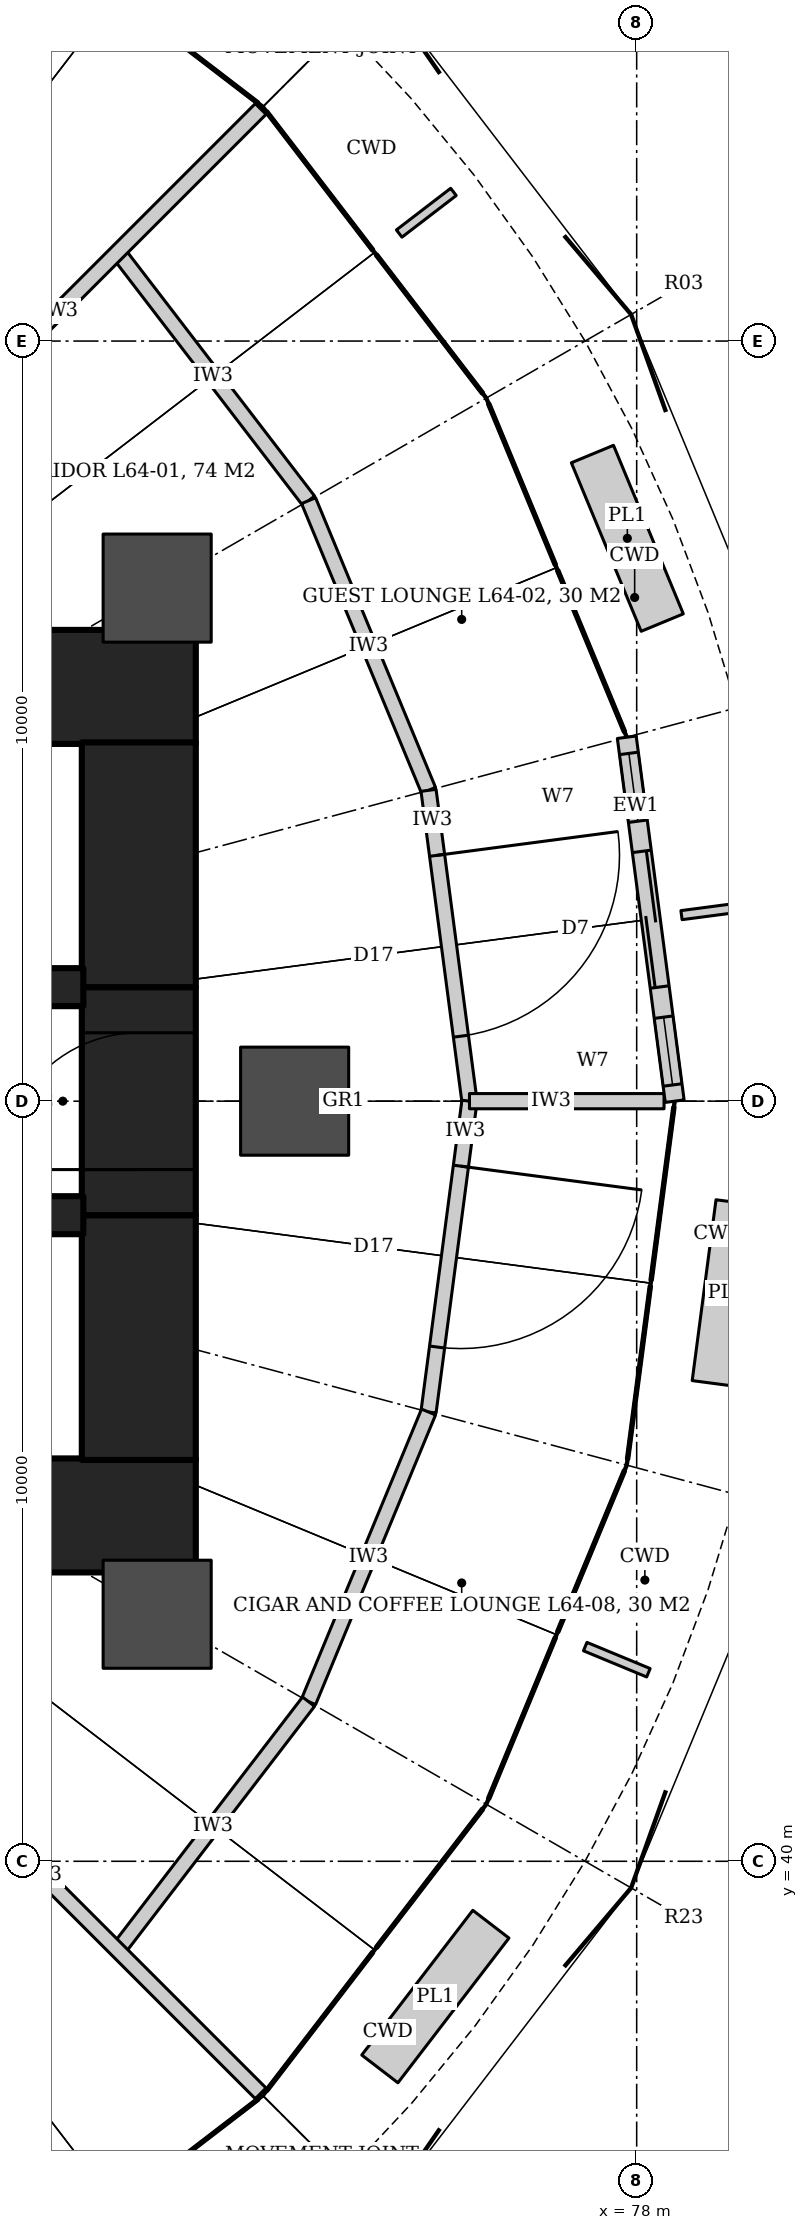
"""IFC4 building model, lengths in metres.
Left out: names, types, materials, properties, quantities, classifications, styles, units other than length and angle.
Written with IfcOpenShell. Run it as: python <this file> out.ifc"""

import sys

from ifc_helpers import new_model, si_unit, direction, frame, frame_2d, origin, origin_2d, place, context, subcontext, project, spatial, rectangle, hollow_circle, extrude, element, fill, save


model = new_model("IFC4")
c1 = context("Model", 3, precision=1e-05, world=origin(), true_north=direction((0.0, 1.0)))
c2 = subcontext(c1, "Body", "Model", "MODEL_VIEW")
j1 = project(units=[si_unit("LENGTHUNIT", "METRE"), si_unit("PLANEANGLEUNIT", "RADIAN")], contexts=[c1])
p1 = place(None, origin())
s1 = spatial("IfcSite", under=j1, at=p1, CompositionType="ELEMENT")
p2 = place(p1, origin())
s2 = spatial("IfcBuilding", under=s1, at=p2, CompositionType="ELEMENT")
p3 = place(p2, frame((0.0, 0.0, 278.0)))
s3 = spatial("IfcBuildingStorey", under=s2, at=p3, CompositionType="ELEMENT", Elevation=278.0)
for number, where, z_axis, x_axis in (
    (1, (64.6, 55.45, 0.0), (0.0, 0.0, 1.0), (1.0, 0.0, 0.0)),
    (2, (64.6, 44.55, 0.0), (0.0, 0.0, 1.0), (1.0, 0.0, 0.0)),
):
    element("IfcWall", number, at=place(p3, frame(where, z_axis=z_axis, x_axis=x_axis)), inside=s3, PredefinedType="SHEAR", context=c2, shape_type="SweptSolid", body=[
        extrude(rectangle(XDim=7.6, YDim=1.5, at=frame_2d((3.8, 0.0))), origin(), (0.0, 0.0, 1.0), 4.2),
    ])
p4 = place(p3, frame((71.45, 45.28, 0.0), z_axis=(0.0, 0.0, 1.0), x_axis=(0.0, 1.0, 0.0)))
e3 = element("IfcWall", 3, at=p4, inside=s3, PredefinedType="SHEAR", context=c2, shape_type="SweptSolid", body=[
    extrude(rectangle(XDim=3.22, YDim=1.5, at=frame_2d((1.61, 0.0))), origin(), (0.0, 0.0, 1.0), 4.2),
])
p5 = place(p3, frame((71.45, 48.5, 0.0), z_axis=(0.0, 0.0, 1.0), x_axis=(0.0, 1.0, 0.0)))
e4 = element("IfcWall", 4, at=p5, inside=s3, PredefinedType="SHEAR", context=c2, shape_type="SweptSolid", body=[
    extrude(rectangle(XDim=3.0, YDim=1.5, at=frame_2d((1.5, 0.0))), origin(), (0.0, 0.0, 1.0), 4.2),
])
p6 = place(p5, frame((0.6, 0.0, 0.0)))
e5 = element("IfcOpeningElement", 5, at=p6, cuts=e4, PredefinedType="OPENING", context=c2, shape_type="SweptSolid", body=[
    extrude(rectangle(XDim=1.8, YDim=2.1, at=frame_2d((0.9, 1.05))), frame((0.0, 0.76, 0.0), z_axis=(0.0, -1.0, 0.0), x_axis=(1.0, 0.0, 0.0)), (0.0, 0.0, 1.0), 1.52),
])
p7 = place(p3, frame((71.45, 51.5, 0.0), z_axis=(0.0, 0.0, 1.0), x_axis=(0.0, 1.0, 0.0)))
e6 = element("IfcWall", 6, at=p7, inside=s3, PredefinedType="SHEAR", context=c2, shape_type="SweptSolid", body=[
    extrude(rectangle(XDim=3.22, YDim=1.5, at=frame_2d((1.61, 0.0))), origin(), (0.0, 0.0, 1.0), 4.2),
])
p8 = place(p3, frame((64.6, 51.5, 0.0), z_axis=(0.0, 0.0, 1.0), x_axis=(1.0, 0.0, 0.0)))
e7 = element("IfcWall", 7, at=p8, inside=s3, PredefinedType="SHEAR", context=c2, shape_type="SweptSolid", body=[
    extrude(rectangle(XDim=6.12, YDim=0.5, at=frame_2d((3.06, 0.0))), origin(), (0.0, 0.0, 1.0), 4.2),
])
p9 = place(p8, frame((1.0, 0.0, 0.0)))
e8 = element("IfcOpeningElement", 8, at=p9, cuts=e7, PredefinedType="OPENING", context=c2, shape_type="SweptSolid", body=[
    extrude(rectangle(XDim=1.2, YDim=2.1, at=frame_2d((0.6, 1.05))), frame((0.0, 0.26, 0.0), z_axis=(0.0, -1.0, 0.0), x_axis=(1.0, 0.0, 0.0)), (0.0, 0.0, 1.0), 0.52),
])
p10 = place(p8, frame((4.2, 0.0, 0.0)))
e9 = element("IfcOpeningElement", 9, at=p10, cuts=e7, PredefinedType="OPENING", context=c2, shape_type="SweptSolid", body=[
    extrude(rectangle(XDim=1.2, YDim=2.1, at=frame_2d((0.6, 1.05))), frame((0.0, 0.26, 0.0), z_axis=(0.0, -1.0, 0.0), x_axis=(1.0, 0.0, 0.0)), (0.0, 0.0, 1.0), 0.52),
])
p11 = place(p3, frame((64.6, 48.5, 0.0), z_axis=(0.0, 0.0, 1.0), x_axis=(1.0, 0.0, 0.0)))
e10 = element("IfcWall", 10, at=p11, inside=s3, PredefinedType="SHEAR", context=c2, shape_type="SweptSolid", body=[
    extrude(rectangle(XDim=6.12, YDim=0.5, at=frame_2d((3.06, 0.0))), origin(), (0.0, 0.0, 1.0), 4.2),
])
p12 = place(p11, frame((0.5, 0.0, 0.0)))
e11 = element("IfcOpeningElement", 11, at=p12, cuts=e10, PredefinedType="OPENING", context=c2, shape_type="SweptSolid", body=[
    extrude(rectangle(XDim=1.0, YDim=2.1, at=frame_2d((0.5, 1.05))), frame((0.0, 0.26, 0.0), z_axis=(0.0, -1.0, 0.0), x_axis=(1.0, 0.0, 0.0)), (0.0, 0.0, 1.0), 0.52),
])
for number, where, z_axis, x_axis in (
    (12, (73.5, 50.0, 0.0), (0.0, 0.0, 1.0), (1.0, 0.0, 0.0)),
    (13, (71.691, 56.75, 0.0), (0.0, 0.0, 1.0), (1.0, 0.0, 0.0)),
    (14, (71.691, 43.25, 0.0), (0.0, 0.0, 1.0), (1.0, 0.0, 0.0)),
):
    element("IfcColumn", number, at=place(p3, frame(where, z_axis=z_axis, x_axis=x_axis)), inside=s3, PredefinedType="COLUMN", context=c2, shape_type="SweptSolid", body=[
        extrude(hollow_circle(Radius=0.711, WallThickness=0.07, at=origin_2d()), origin(), (0.0, 0.0, 1.0), 4.2),
    ])
p13 = place(p3, frame((71.172, 61.172, 0.0), z_axis=(0.0, 0.0, 1.0), x_axis=(0.608714823874, -0.793389099494, 0.0)))
e15 = element("IfcWall", 15, at=p13, inside=s3, PredefinedType="PARTITIONING", context=c2, shape_type="SweptSolid", body=[
    extrude(rectangle(XDim=4.125, YDim=0.2, at=frame_2d((2.062, 0.0))), origin(), (0.0, 0.0, 1.0), 3.02),
])
p14 = place(p3, frame((73.683, 57.9, 0.0), z_axis=(0.0, 0.0, 1.0), x_axis=(0.382731667114, -0.923859551549, 0.0)))
e16 = element("IfcWall", 16, at=p14, inside=s3, PredefinedType="PARTITIONING", context=c2, shape_type="SweptSolid", body=[
    extrude(rectangle(XDim=4.125, YDim=0.2, at=frame_2d((2.062, 0.0))), origin(), (0.0, 0.0, 1.0), 3.02),
])
p15 = place(p3, frame((75.262, 54.089, 0.0), z_axis=(0.0, 0.0, 1.0), x_axis=(0.130515758099, -0.991446234996, 0.0)))
e17 = element("IfcWall", 17, at=p15, inside=s3, PredefinedType="PARTITIONING", context=c2, shape_type="SweptSolid", body=[
    extrude(rectangle(XDim=4.125, YDim=0.2, at=frame_2d((2.062, 0.0))), origin(), (0.0, 0.0, 1.0), 3.02),
])
p16 = place(p15, frame((0.862, 0.0, 0.0)))
e18 = element("IfcOpeningElement", 18, at=p16, cuts=e17, PredefinedType="OPENING", context=c2, shape_type="SweptSolid", body=[
    extrude(rectangle(XDim=2.4, YDim=2.4, at=frame_2d((1.2, 1.2))), frame((0.0, 0.11, 0.0), z_axis=(0.0, -1.0, 0.0), x_axis=(1.0, 0.0, 0.0)), (0.0, 0.0, 1.0), 0.22),
])
p17 = place(p3, frame((75.8, 50.0, 0.0), z_axis=(0.0, 0.0, 1.0), x_axis=(-0.130515758099, -0.991446234996, 0.0)))
e19 = element("IfcWall", 19, at=p17, inside=s3, PredefinedType="PARTITIONING", context=c2, shape_type="SweptSolid", body=[
    extrude(rectangle(XDim=4.125, YDim=0.2, at=frame_2d((2.062, 0.0))), origin(), (0.0, 0.0, 1.0), 3.02),
])
p18 = place(p17, frame((0.862, 0.0, 0.0)))
e20 = element("IfcOpeningElement", 20, at=p18, cuts=e19, PredefinedType="OPENING", context=c2, shape_type="SweptSolid", body=[
    extrude(rectangle(XDim=2.4, YDim=2.4, at=frame_2d((1.2, 1.2))), frame((0.0, 0.11, 0.0), z_axis=(0.0, -1.0, 0.0), x_axis=(1.0, 0.0, 0.0)), (0.0, 0.0, 1.0), 0.22),
])
p19 = place(p3, frame((75.262, 45.911, 0.0), z_axis=(0.0, 0.0, 1.0), x_axis=(-0.382731667114, -0.923859551549, 0.0)))
e21 = element("IfcWall", 21, at=p19, inside=s3, PredefinedType="PARTITIONING", context=c2, shape_type="SweptSolid", body=[
    extrude(rectangle(XDim=4.125, YDim=0.2, at=frame_2d((2.062, 0.0))), origin(), (0.0, 0.0, 1.0), 3.02),
])
p20 = place(p3, frame((73.683, 42.1, 0.0), z_axis=(0.0, 0.0, 1.0), x_axis=(-0.608714823874, -0.793389099494, 0.0)))
e22 = element("IfcWall", 22, at=p20, inside=s3, PredefinedType="PARTITIONING", context=c2, shape_type="SweptSolid", body=[
    extrude(rectangle(XDim=4.125, YDim=0.2, at=frame_2d((2.062, 0.0))), origin(), (0.0, 0.0, 1.0), 3.02),
])
p21 = place(p3, frame((75.8, 50.0, 0.0), z_axis=(0.0, 0.0, 1.0), x_axis=(1.0, 0.0, 0.0)))
e23 = element("IfcWall", 23, at=p21, inside=s3, PredefinedType="PARTITIONING", context=c2, shape_type="SweptSolid", body=[
    extrude(rectangle(XDim=2.56, YDim=0.2, at=frame_2d((1.28, 0.0))), origin(), (0.0, 0.0, 1.0), 3.02),
])
p22 = place(p3, frame((66.2, 56.2, 0.0), z_axis=(0.0, 0.0, 1.0), x_axis=(0.707106781187, 0.707106781187, 0.0)))
e24 = element("IfcWall", 24, at=p22, inside=s3, PredefinedType="PARTITIONING", context=c2, shape_type="SweptSolid", body=[
    extrude(rectangle(XDim=9.692, YDim=0.2, at=frame_2d((4.846, 0.0))), origin(), (0.0, 0.0, 1.0), 3.02),
])
p23 = place(p22, frame((2.516, 0.0, 0.0)))
e25 = element("IfcOpeningElement", 25, at=p23, cuts=e24, PredefinedType="OPENING", context=c2, shape_type="SweptSolid", body=[
    extrude(rectangle(XDim=2.0, YDim=2.7, at=frame_2d((1.0, 1.35))), frame((0.0, 0.11, 0.0), z_axis=(0.0, -1.0, 0.0), x_axis=(1.0, 0.0, 0.0)), (0.0, 0.0, 1.0), 0.22),
])
p24 = place(p3, frame((66.2, 43.8, 0.0), z_axis=(0.0, 0.0, 1.0), x_axis=(0.707106781187, -0.707106781187, 0.0)))
e26 = element("IfcWall", 26, at=p24, inside=s3, PredefinedType="PARTITIONING", context=c2, shape_type="SweptSolid", body=[
    extrude(rectangle(XDim=9.692, YDim=0.2, at=frame_2d((4.846, 0.0))), origin(), (0.0, 0.0, 1.0), 3.02),
])
p25 = place(p3, frame((78.5, 50.0, 0.0), z_axis=(0.0, 0.0, 1.0), x_axis=(-0.130527743461, 0.991444657148, 0.0)))
e27 = element("IfcWall", 27, at=p25, inside=s3, PredefinedType="SOLIDWALL", context=c2, shape_type="SweptSolid", body=[
    extrude(rectangle(XDim=4.829, YDim=0.25, at=frame_2d((2.415, 0.0))), origin(), (0.0, 0.0, 1.0), 4.04),
])
p26 = place(p25, frame((1.515, 0.0, 0.0)))
e28 = element("IfcOpeningElement", 28, at=p26, cuts=e27, PredefinedType="OPENING", context=c2, shape_type="SweptSolid", body=[
    extrude(rectangle(XDim=1.8, YDim=2.4, at=frame_2d((0.9, 1.2))), frame((0.0, 0.135, 0.0), z_axis=(0.0, -1.0, 0.0), x_axis=(1.0, 0.0, 0.0)), (0.0, 0.0, 1.0), 0.27),
])
p27 = place(p25, frame((0.215, 0.0, 0.0)))
e29 = element("IfcOpeningElement", 29, at=p27, cuts=e27, PredefinedType="OPENING", context=c2, shape_type="SweptSolid", body=[
    extrude(rectangle(XDim=0.9, YDim=2.4, at=frame_2d((0.45, 1.2))), frame((0.0, 0.135, 0.0), z_axis=(0.0, -1.0, 0.0), x_axis=(1.0, 0.0, 0.0)), (0.0, 0.0, 1.0), 0.27),
])
p28 = place(p25, frame((3.715, 0.0, 0.0)))
e30 = element("IfcOpeningElement", 30, at=p28, cuts=e27, PredefinedType="OPENING", context=c2, shape_type="SweptSolid", body=[
    extrude(rectangle(XDim=0.9, YDim=2.4, at=frame_2d((0.45, 1.2))), frame((0.0, 0.135, 0.0), z_axis=(0.0, -1.0, 0.0), x_axis=(1.0, 0.0, 0.0)), (0.0, 0.0, 1.0), 0.27),
])
p29 = place(p16, origin())
e31 = element("IfcDoor", 31, at=p29, inside=s3, OperationType="DOUBLE_DOOR_DOUBLE_SWING", PredefinedType="DOOR", context=c2, shape_type="SweptSolid", body=[
    extrude(rectangle(XDim=2.4, YDim=2.4, at=frame_2d((1.2, 1.2))), frame((0.0, 0.025, 0.0), z_axis=(0.0, -1.0, 0.0), x_axis=(1.0, 0.0, 0.0)), (0.0, 0.0, 1.0), 0.05),
])
fill(e18, e31)
p30 = place(p18, origin())
e32 = element("IfcDoor", 32, at=p30, inside=s3, OperationType="DOUBLE_DOOR_DOUBLE_SWING", PredefinedType="DOOR", context=c2, shape_type="SweptSolid", body=[
    extrude(rectangle(XDim=2.4, YDim=2.4, at=frame_2d((1.2, 1.2))), frame((0.0, 0.025, 0.0), z_axis=(0.0, -1.0, 0.0), x_axis=(1.0, 0.0, 0.0)), (0.0, 0.0, 1.0), 0.05),
])
fill(e20, e32)
p31 = place(p26, origin())
e33 = element("IfcDoor", 33, at=p31, inside=s3, OperationType="DOUBLE_DOOR_SLIDING", PredefinedType="DOOR", context=c2, shape_type="SweptSolid", body=[
    extrude(rectangle(XDim=1.8, YDim=2.4, at=frame_2d((0.9, 1.2))), frame((0.0, 0.025, 0.0), z_axis=(0.0, -1.0, 0.0), x_axis=(1.0, 0.0, 0.0)), (0.0, 0.0, 1.0), 0.05),
])
fill(e28, e33)
p32 = place(p27, origin())
e34 = element("IfcWindow", 34, at=p32, inside=s3, PartitioningType="SINGLE_PANEL", PredefinedType="WINDOW", context=c2, shape_type="SweptSolid", body=[
    extrude(rectangle(XDim=0.9, YDim=2.4, at=frame_2d((0.45, 1.2))), frame((0.0, 0.03, 0.0), z_axis=(0.0, -1.0, 0.0), x_axis=(1.0, 0.0, 0.0)), (0.0, 0.0, 1.0), 0.06),
])
fill(e29, e34)
p33 = place(p28, origin())
e35 = element("IfcWindow", 35, at=p33, inside=s3, PartitioningType="SINGLE_PANEL", PredefinedType="WINDOW", context=c2, shape_type="SweptSolid", body=[
    extrude(rectangle(XDim=0.9, YDim=2.4, at=frame_2d((0.45, 1.2))), frame((0.0, 0.03, 0.0), z_axis=(0.0, -1.0, 0.0), x_axis=(1.0, 0.0, 0.0)), (0.0, 0.0, 1.0), 0.06),
])
fill(e30, e35)
p34 = place(p6, origin())
e36 = element("IfcDoor", 36, at=p34, inside=s3, OperationType="DOUBLE_DOOR_DOUBLE_SWING", PredefinedType="DOOR", context=c2, shape_type="SweptSolid", body=[
    extrude(rectangle(XDim=1.8, YDim=2.1, at=frame_2d((0.9, 1.05))), frame((0.0, 0.025, 0.0), z_axis=(0.0, -1.0, 0.0), x_axis=(1.0, 0.0, 0.0)), (0.0, 0.0, 1.0), 0.05),
])
fill(e5, e36)
save(model, sys.argv[1])
